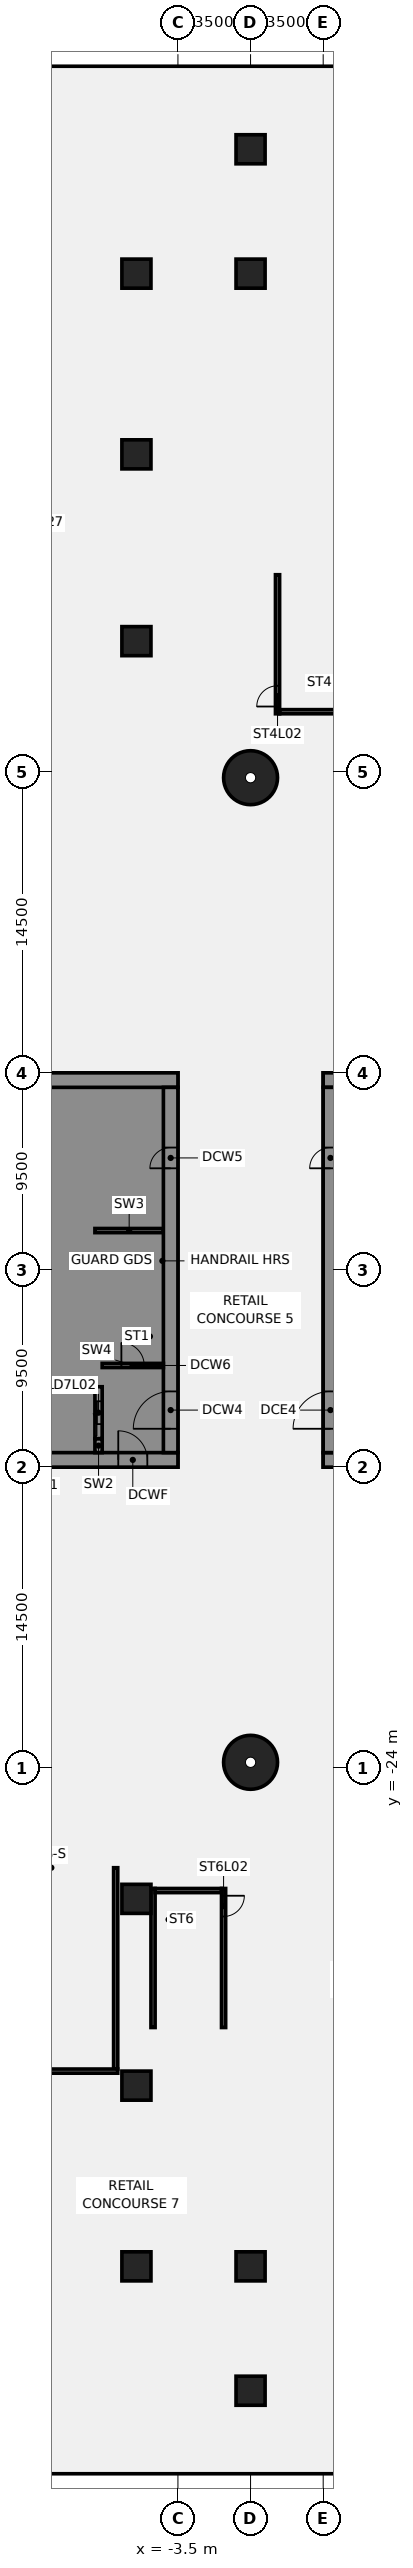
"""IFC4 building model, lengths in metres.
Left out: names, types, materials, properties, quantities, classifications, styles, units other than length and angle.
Written with IfcOpenShell. Run it as: python <this file> out.ifc"""

import sys

from ifc_helpers import new_model, si_unit, direction, frame, frame_2d, origin, origin_2d, place, context, subcontext, project, spatial, polyline, rectangle, circle, outline, extrude, element, fill, save


model = new_model("IFC4")
c1 = context("Model", 3, precision=1e-05, world=origin(), true_north=direction((0.0, 1.0)))
c2 = subcontext(c1, "Body", "Model", "MODEL_VIEW")
j1 = project(units=[si_unit("LENGTHUNIT", "METRE"), si_unit("PLANEANGLEUNIT", "RADIAN")], contexts=[c1])
p1 = place(None, origin())
s1 = spatial("IfcSite", under=j1, at=p1, CompositionType="ELEMENT")
p2 = place(p1, origin())
s2 = spatial("IfcBuilding", under=s1, at=p2, CompositionType="ELEMENT")
p3 = place(p2, frame((0.0, 0.0, 15.0)))
s3 = spatial("IfcBuildingStorey", under=s2, at=p3, CompositionType="ELEMENT", Elevation=15.0)
for number, where, z_axis, x_axis in (
    (1, (0.0, 23.721, -0.5), (0.0, 0.0, 1.0), (1.0, 0.0, 0.0)),
    (2, (0.0, -23.721, -0.5), (0.0, 0.0, 1.0), (1.0, 0.0, 0.0)),
):
    element("IfcColumn", number, at=place(p3, frame(where, z_axis=z_axis, x_axis=x_axis)), inside=s3, PredefinedType="COLUMN", context=c2, shape_type="SweptSolid", body=[
        extrude(circle(Radius=1.3, at=origin_2d()), origin(), (0.0, 0.0, 1.0), 5.0),
    ])
for number, where, z_axis, x_axis in (
    (3, (-5.5, 39.3, -0.5), (0.0, 0.0, 1.0), (1.0, 0.0, 0.0)),
    (4, (-5.5, 30.3, -0.5), (0.0, 0.0, 1.0), (1.0, 0.0, 0.0)),
    (5, (0.0, 48.008, -0.5), (0.0, 0.0, 1.0), (1.0, 0.0, 0.0)),
    (6, (-5.5, 48.008, -0.5), (0.0, 0.0, 1.0), (1.0, 0.0, 0.0)),
    (7, (-5.5, -39.3, -0.5), (0.0, 0.0, 1.0), (1.0, 0.0, 0.0)),
    (8, (-5.5, -30.3, -0.5), (0.0, 0.0, 1.0), (1.0, 0.0, 0.0)),
    (9, (-5.5, -48.008, -0.5), (0.0, 0.0, 1.0), (1.0, 0.0, 0.0)),
    (10, (0.0, -48.008, -0.5), (0.0, 0.0, 1.0), (1.0, 0.0, 0.0)),
    (11, (0.0, -54.0, -0.5), (0.0, 0.0, 1.0), (1.0, 0.0, 0.0)),
    (12, (0.0, 54.0, -0.5), (0.0, 0.0, 1.0), (1.0, 0.0, 0.0)),
):
    element("IfcColumn", number, at=place(p3, frame(where, z_axis=z_axis, x_axis=x_axis)), inside=s3, PredefinedType="COLUMN", context=c2, shape_type="SweptSolid", body=[
        extrude(rectangle(XDim=1.4, YDim=1.4, at=origin_2d()), origin(), (0.0, 0.0, 1.0), 5.0),
    ])
p4 = place(p3, frame((-6.5, -28.8, 0.0), z_axis=(0.0, 0.0, 1.0), x_axis=(0.0, -1.0, 0.0)))
e13 = element("IfcWall", 13, at=p4, inside=s3, PredefinedType="SOLIDWALL", context=c2, shape_type="SweptSolid", body=[
    extrude(rectangle(XDim=9.7, YDim=0.2, at=frame_2d((4.85, 0.0))), origin(), (0.0, 0.0, 1.0), 4.5),
])
p5 = place(p3, frame((-10.7, -38.6, 0.0), z_axis=(0.0, 0.0, 1.0), x_axis=(1.0, 0.0, 0.0)))
e14 = element("IfcWall", 14, at=p5, inside=s3, PredefinedType="SOLIDWALL", context=c2, shape_type="SweptSolid", body=[
    extrude(rectangle(XDim=4.3, YDim=0.2, at=frame_2d((2.15, 0.0))), origin(), (0.0, 0.0, 1.0), 4.5),
])
p6 = place(p3, frame((-16.5, -9.15, 0.0), z_axis=(0.0, 0.0, 1.0), x_axis=(1.0, 0.0, 0.0)))
e15 = element("IfcWall", 15, at=p6, inside=s3, PredefinedType="SHEAR", context=c2, shape_type="SweptSolid", body=[
    extrude(rectangle(XDim=13.0, YDim=0.7, at=frame_2d((6.5, 0.0))), origin(), (0.0, 0.0, 1.0), 4.5),
])
p7 = place(p6, frame((4.15, 0.0, 0.0)))
e16 = element("IfcOpeningElement", 16, at=p7, cuts=e15, PredefinedType="OPENING", context=c2, shape_type="SweptSolid", body=[
    extrude(rectangle(XDim=1.4, YDim=2.1, at=frame_2d((0.7, 1.05))), frame((0.0, 0.36, 0.0), z_axis=(0.0, -1.0, 0.0), x_axis=(1.0, 0.0, 0.0)), (0.0, 0.0, 1.0), 0.72),
])
p8 = place(p6, frame((10.125, 0.0, 0.0)))
e17 = element("IfcOpeningElement", 17, at=p8, cuts=e15, PredefinedType="OPENING", context=c2, shape_type="SweptSolid", body=[
    extrude(rectangle(XDim=1.4, YDim=2.1, at=frame_2d((0.7, 1.05))), frame((0.0, 0.36, 0.0), z_axis=(0.0, -1.0, 0.0), x_axis=(1.0, 0.0, 0.0)), (0.0, 0.0, 1.0), 0.72),
])
p9 = place(p3, frame((-16.5, 9.15, 0.0), z_axis=(0.0, 0.0, 1.0), x_axis=(1.0, 0.0, 0.0)))
e18 = element("IfcWall", 18, at=p9, inside=s3, PredefinedType="SHEAR", context=c2, shape_type="SweptSolid", body=[
    extrude(rectangle(XDim=13.0, YDim=0.7, at=frame_2d((6.5, 0.0))), origin(), (0.0, 0.0, 1.0), 4.5),
])
p10 = place(p3, origin())
e19 = element("IfcWall", 19, at=p10, inside=s3, PredefinedType="SHEAR", context=c2, shape_type="SweptSolid", body=[
    extrude(outline(polyline([(-9.8, -5.375), (-9.8, -5.625), (-7.5, -5.625), (-7.15, -5.625), (-7.15, 8.8), (-7.5, 8.8), (-9.8, 8.8), (-9.8, 8.125), (-7.5, 8.125), (-7.5, 5.625), (-9.8, 5.625), (-9.8, 5.375), (-7.5, 5.375), (-7.5, 2.875), (-9.8, 2.875), (-9.8, 2.625), (-7.5, 2.625), (-7.5, 0.125), (-9.8, 0.125), (-9.8, -0.125), (-7.5, -0.125), (-7.5, -2.625), (-9.8, -2.625), (-9.8, -2.875), (-7.5, -2.875), (-7.5, -5.375), (-9.8, -5.375)])), origin(), (0.0, 0.0, 1.0), 4.5),
])
p11 = place(p3, origin())
e20 = element("IfcWall", 20, at=p11, inside=s3, PredefinedType="SHEAR", context=c2, shape_type="SweptSolid", body=[
    extrude(outline(polyline([(-7.5, -8.125), (-9.55, -8.125), (-9.55, -5.625), (-9.8, -5.625), (-9.8, -8.125), (-9.8, -8.8), (-7.5, -8.8), (-7.5, -8.125)])), origin(), (0.0, 0.0, 1.0), 4.5),
])
p12 = place(p3, frame((-7.325, -8.8, 0.0), z_axis=(0.0, 0.0, 1.0), x_axis=(0.0, 1.0, 0.0)))
e21 = element("IfcWall", 21, at=p12, inside=s3, PredefinedType="SHEAR", context=c2, shape_type="SweptSolid", body=[
    extrude(rectangle(XDim=0.675, YDim=0.35, at=frame_2d((0.337, 0.0))), origin(), (0.0, 0.0, 1.0), 4.5),
])
p13 = place(p3, frame((-7.5, 1.9, 0.0), z_axis=(0.0, 0.0, 1.0), x_axis=(1.0, 0.0, 0.0)))
e22 = element("IfcWall", 22, at=p13, inside=s3, PredefinedType="SHEAR", context=c2, shape_type="SweptSolid", body=[
    extrude(rectangle(XDim=3.3, YDim=0.2, at=frame_2d((1.65, 0.0))), origin(), (0.0, 0.0, 1.0), 4.5),
])
p14 = place(p3, frame((-7.325, -8.125, 0.0), z_axis=(0.0, 0.0, 1.0), x_axis=(0.0, 1.0, 0.0)))
e23 = element("IfcWall", 23, at=p14, inside=s3, PredefinedType="SHEAR", context=c2, shape_type="SweptSolid", body=[
    extrude(rectangle(XDim=2.5, YDim=0.35, at=frame_2d((1.25, 0.0))), origin(), (0.0, 0.0, 1.0), 4.5),
])
p15 = place(p14, frame((0.7, 0.0, 0.0)))
e24 = element("IfcOpeningElement", 24, at=p15, cuts=e23, PredefinedType="OPENING", context=c2, shape_type="SweptSolid", body=[
    extrude(rectangle(XDim=1.1, YDim=2.1, at=frame_2d((0.55, 1.05))), frame((0.0, 0.185, 0.0), z_axis=(0.0, -1.0, 0.0), x_axis=(1.0, 0.0, 0.0)), (0.0, 0.0, 1.0), 0.37),
])
p16 = place(p3, frame((-3.85, -8.8, 0.0), z_axis=(0.0, 0.0, 1.0), x_axis=(0.0, 1.0, 0.0)))
e25 = element("IfcWall", 25, at=p16, inside=s3, PredefinedType="SHEAR", context=c2, shape_type="SweptSolid", body=[
    extrude(rectangle(XDim=17.6, YDim=0.7, at=frame_2d((8.8, 0.0))), origin(), (0.0, 0.0, 1.0), 4.5),
])
p17 = place(p16, frame((1.15, 0.0, 0.0)))
e26 = element("IfcOpeningElement", 26, at=p17, cuts=e25, PredefinedType="OPENING", context=c2, shape_type="SweptSolid", body=[
    extrude(rectangle(XDim=1.8, YDim=2.1, at=frame_2d((0.9, 1.05))), frame((0.0, 0.36, 0.0), z_axis=(0.0, -1.0, 0.0), x_axis=(1.0, 0.0, 0.0)), (0.0, 0.0, 1.0), 0.72),
])
p18 = place(p16, frame((13.7, 0.0, 0.0)))
e27 = element("IfcOpeningElement", 27, at=p18, cuts=e25, PredefinedType="OPENING", context=c2, shape_type="SweptSolid", body=[
    extrude(rectangle(XDim=1.0, YDim=2.1, at=frame_2d((0.5, 1.05))), frame((0.0, 0.36, 0.0), z_axis=(0.0, -1.0, 0.0), x_axis=(1.0, 0.0, 0.0)), (0.0, 0.0, 1.0), 0.72),
])
p19 = place(p3, frame((-7.15, -4.6, 0.0), z_axis=(0.0, 0.0, 1.0), x_axis=(1.0, 0.0, 0.0)))
e28 = element("IfcWall", 28, at=p19, inside=s3, PredefinedType="SHEAR", context=c2, shape_type="SweptSolid", body=[
    extrude(rectangle(XDim=2.95, YDim=0.2, at=frame_2d((1.475, 0.0))), origin(), (0.0, 0.0, 1.0), 4.5),
])
p20 = place(p19, frame((0.925, 0.0, 0.0)))
e29 = element("IfcOpeningElement", 29, at=p20, cuts=e28, PredefinedType="OPENING", context=c2, shape_type="SweptSolid", body=[
    extrude(rectangle(XDim=1.1, YDim=2.1, at=frame_2d((0.55, 1.05))), frame((0.0, 0.11, 0.0), z_axis=(0.0, -1.0, 0.0), x_axis=(1.0, 0.0, 0.0)), (0.0, 0.0, 1.0), 0.22),
])
p21 = place(p3, frame((16.5, -9.15, 0.0), z_axis=(0.0, 0.0, 1.0), x_axis=(-1.0, 0.0, 0.0)))
e30 = element("IfcWall", 30, at=p21, inside=s3, PredefinedType="SHEAR", context=c2, shape_type="SweptSolid", body=[
    extrude(rectangle(XDim=13.0, YDim=0.7, at=frame_2d((6.5, 0.0))), origin(), (0.0, 0.0, 1.0), 4.5),
])
p22 = place(p21, frame((4.15, 0.0, 0.0)))
e31 = element("IfcOpeningElement", 31, at=p22, cuts=e30, PredefinedType="OPENING", context=c2, shape_type="SweptSolid", body=[
    extrude(rectangle(XDim=1.4, YDim=2.1, at=frame_2d((0.7, 1.05))), frame((0.0, 0.36, 0.0), z_axis=(0.0, -1.0, 0.0), x_axis=(1.0, 0.0, 0.0)), (0.0, 0.0, 1.0), 0.72),
])
p23 = place(p21, frame((10.125, 0.0, 0.0)))
e32 = element("IfcOpeningElement", 32, at=p23, cuts=e30, PredefinedType="OPENING", context=c2, shape_type="SweptSolid", body=[
    extrude(rectangle(XDim=1.4, YDim=2.1, at=frame_2d((0.7, 1.05))), frame((0.0, 0.36, 0.0), z_axis=(0.0, -1.0, 0.0), x_axis=(1.0, 0.0, 0.0)), (0.0, 0.0, 1.0), 0.72),
])
p24 = place(p3, frame((16.5, 9.15, 0.0), z_axis=(0.0, 0.0, 1.0), x_axis=(-1.0, 0.0, 0.0)))
e33 = element("IfcWall", 33, at=p24, inside=s3, PredefinedType="SHEAR", context=c2, shape_type="SweptSolid", body=[
    extrude(rectangle(XDim=13.0, YDim=0.7, at=frame_2d((6.5, 0.0))), origin(), (0.0, 0.0, 1.0), 4.5),
])
p25 = place(p3, frame((3.85, -8.8, 0.0), z_axis=(0.0, 0.0, 1.0), x_axis=(0.0, 1.0, 0.0)))
e34 = element("IfcWall", 34, at=p25, inside=s3, PredefinedType="SHEAR", context=c2, shape_type="SweptSolid", body=[
    extrude(rectangle(XDim=17.6, YDim=0.7, at=frame_2d((8.8, 0.0))), origin(), (0.0, 0.0, 1.0), 4.5),
])
p26 = place(p25, frame((1.15, 0.0, 0.0)))
e35 = element("IfcOpeningElement", 35, at=p26, cuts=e34, PredefinedType="OPENING", context=c2, shape_type="SweptSolid", body=[
    extrude(rectangle(XDim=1.8, YDim=2.1, at=frame_2d((0.9, 1.05))), frame((0.0, 0.36, 0.0), z_axis=(0.0, -1.0, 0.0), x_axis=(1.0, 0.0, 0.0)), (0.0, 0.0, 1.0), 0.72),
])
p27 = place(p25, frame((13.7, 0.0, 0.0)))
e36 = element("IfcOpeningElement", 36, at=p27, cuts=e34, PredefinedType="OPENING", context=c2, shape_type="SweptSolid", body=[
    extrude(rectangle(XDim=1.0, YDim=2.1, at=frame_2d((0.5, 1.05))), frame((0.0, 0.36, 0.0), z_axis=(0.0, -1.0, 0.0), x_axis=(1.0, 0.0, 0.0)), (0.0, 0.0, 1.0), 0.72),
])
p28 = place(p3, frame((1.3, 26.8, 0.0), z_axis=(0.0, 0.0, 1.0), x_axis=(0.0, 1.0, 0.0)))
e37 = element("IfcWall", 37, at=p28, inside=s3, PredefinedType="SHEAR", context=c2, shape_type="SweptSolid", body=[
    extrude(rectangle(XDim=6.7, YDim=0.2, at=frame_2d((3.35, 0.0))), origin(), (0.0, 0.0, 1.0), 4.5),
])
p29 = place(p28, frame((0.35, 0.0, 0.0)))
e38 = element("IfcOpeningElement", 38, at=p29, cuts=e37, PredefinedType="OPENING", context=c2, shape_type="SweptSolid", body=[
    extrude(rectangle(XDim=1.0, YDim=2.1, at=frame_2d((0.5, 1.05))), frame((0.0, 0.11, 0.0), z_axis=(0.0, -1.0, 0.0), x_axis=(1.0, 0.0, 0.0)), (0.0, 0.0, 1.0), 0.22),
])
p30 = place(p3, frame((4.6, 26.9, 0.0), z_axis=(0.0, 0.0, 1.0), x_axis=(-1.0, 0.0, 0.0)))
e39 = element("IfcWall", 39, at=p30, inside=s3, PredefinedType="SHEAR", context=c2, shape_type="SweptSolid", body=[
    extrude(rectangle(XDim=3.2, YDim=0.2, at=frame_2d((1.6, 0.0))), origin(), (0.0, 0.0, 1.0), 4.5),
])
p31 = place(p3, origin())
e40 = element("IfcWall", 40, at=p31, inside=s3, PredefinedType="SHEAR", context=c2, shape_type="SweptSolid", body=[
    extrude(outline(polyline([(4.6, 33.3), (4.6, 33.5), (1.4, 33.5), (1.4, 33.3), (4.6, 33.3)])), origin(), (0.0, 0.0, 1.0), 4.5),
])
p32 = place(p3, frame((-1.3, -29.8, 0.0), z_axis=(0.0, 0.0, 1.0), x_axis=(0.0, -1.0, 0.0)))
e41 = element("IfcWall", 41, at=p32, inside=s3, PredefinedType="SHEAR", context=c2, shape_type="SweptSolid", body=[
    extrude(rectangle(XDim=6.7, YDim=0.2, at=frame_2d((3.35, 0.0))), origin(), (0.0, 0.0, 1.0), 4.5),
])
p33 = place(p32, frame((0.35, 0.0, 0.0)))
e42 = element("IfcOpeningElement", 42, at=p33, cuts=e41, PredefinedType="OPENING", context=c2, shape_type="SweptSolid", body=[
    extrude(rectangle(XDim=1.0, YDim=2.1, at=frame_2d((0.5, 1.05))), frame((0.0, 0.11, 0.0), z_axis=(0.0, -1.0, 0.0), x_axis=(1.0, 0.0, 0.0)), (0.0, 0.0, 1.0), 0.22),
])
p34 = place(p3, frame((-4.7, -29.8, 0.0), z_axis=(0.0, 0.0, 1.0), x_axis=(0.0, -1.0, 0.0)))
e43 = element("IfcWall", 43, at=p34, inside=s3, PredefinedType="SHEAR", context=c2, shape_type="SweptSolid", body=[
    extrude(rectangle(XDim=6.7, YDim=0.2, at=frame_2d((3.35, 0.0))), origin(), (0.0, 0.0, 1.0), 4.5),
])
p35 = place(p3, frame((-4.6, -29.9, 0.0), z_axis=(0.0, 0.0, 1.0), x_axis=(1.0, 0.0, 0.0)))
e44 = element("IfcWall", 44, at=p35, inside=s3, PredefinedType="SHEAR", context=c2, shape_type="SweptSolid", body=[
    extrude(rectangle(XDim=3.2, YDim=0.2, at=frame_2d((1.6, 0.0))), origin(), (0.0, 0.0, 1.0), 4.5),
])
p36 = place(p3, origin())
e45 = element("IfcWall", 45, at=p36, inside=s3, PredefinedType="SHEAR", context=c2, shape_type="SweptSolid", body=[
    extrude(outline(polyline([(-4.6, -36.3), (-4.6, -36.5), (-1.4, -36.5), (-1.4, -36.3), (-4.6, -36.3)])), origin(), (0.0, 0.0, 1.0), 4.5),
])
p37 = place(p8, origin())
e46 = element("IfcDoor", 46, at=p37, inside=s3, OperationType="SINGLE_SWING_LEFT", PredefinedType="DOOR", context=c2, shape_type="SweptSolid", body=[
    extrude(rectangle(XDim=1.4, YDim=2.1, at=frame_2d((0.7, 1.05))), frame((0.0, 0.025, 0.0), z_axis=(0.0, -1.0, 0.0), x_axis=(1.0, 0.0, 0.0)), (0.0, 0.0, 1.0), 0.05),
])
fill(e17, e46)
p38 = place(p17, origin())
e47 = element("IfcDoor", 47, at=p38, inside=s3, OperationType="SINGLE_SWING_LEFT", PredefinedType="DOOR", context=c2, shape_type="SweptSolid", body=[
    extrude(rectangle(XDim=1.8, YDim=2.1, at=frame_2d((0.9, 1.05))), frame((0.0, 0.025, 0.0), z_axis=(0.0, -1.0, 0.0), x_axis=(1.0, 0.0, 0.0)), (0.0, 0.0, 1.0), 0.05),
])
fill(e26, e47)
p39 = place(p18, origin())
e48 = element("IfcDoor", 48, at=p39, inside=s3, OperationType="SINGLE_SWING_LEFT", PredefinedType="DOOR", context=c2, shape_type="SweptSolid", body=[
    extrude(rectangle(XDim=1.0, YDim=2.1, at=frame_2d((0.5, 1.05))), frame((0.0, 0.025, 0.0), z_axis=(0.0, -1.0, 0.0), x_axis=(1.0, 0.0, 0.0)), (0.0, 0.0, 1.0), 0.05),
])
fill(e27, e48)
p40 = place(p20, origin())
e49 = element("IfcDoor", 49, at=p40, inside=s3, OperationType="SINGLE_SWING_LEFT", PredefinedType="DOOR", context=c2, shape_type="SweptSolid", body=[
    extrude(rectangle(XDim=1.1, YDim=2.1, at=frame_2d((0.55, 1.05))), frame((0.0, 0.025, 0.0), z_axis=(0.0, -1.0, 0.0), x_axis=(1.0, 0.0, 0.0)), (0.0, 0.0, 1.0), 0.05),
])
fill(e29, e49)
p41 = place(p15, origin())
e50 = element("IfcDoor", 50, at=p41, inside=s3, OperationType="SLIDING_TO_LEFT", PredefinedType="DOOR", context=c2, shape_type="SweptSolid", body=[
    extrude(rectangle(XDim=1.1, YDim=2.1, at=frame_2d((0.55, 1.05))), frame((0.0, 0.025, 0.0), z_axis=(0.0, -1.0, 0.0), x_axis=(1.0, 0.0, 0.0)), (0.0, 0.0, 1.0), 0.05),
])
fill(e24, e50)
p42 = place(p26, origin())
e51 = element("IfcDoor", 51, at=p42, inside=s3, OperationType="SINGLE_SWING_LEFT", PredefinedType="DOOR", context=c2, shape_type="SweptSolid", body=[
    extrude(rectangle(XDim=1.8, YDim=2.1, at=frame_2d((0.9, 1.05))), frame((0.0, 0.025, 0.0), z_axis=(0.0, -1.0, 0.0), x_axis=(1.0, 0.0, 0.0)), (0.0, 0.0, 1.0), 0.05),
])
fill(e35, e51)
p43 = place(p27, origin())
e52 = element("IfcDoor", 52, at=p43, inside=s3, OperationType="SINGLE_SWING_LEFT", PredefinedType="DOOR", context=c2, shape_type="SweptSolid", body=[
    extrude(rectangle(XDim=1.0, YDim=2.1, at=frame_2d((0.5, 1.05))), frame((0.0, 0.025, 0.0), z_axis=(0.0, -1.0, 0.0), x_axis=(1.0, 0.0, 0.0)), (0.0, 0.0, 1.0), 0.05),
])
fill(e36, e52)
p44 = place(p29, origin())
e53 = element("IfcDoor", 53, at=p44, inside=s3, OperationType="SINGLE_SWING_LEFT", PredefinedType="DOOR", context=c2, shape_type="SweptSolid", body=[
    extrude(rectangle(XDim=1.0, YDim=2.1, at=frame_2d((0.5, 1.05))), frame((0.0, 0.025, 0.0), z_axis=(0.0, -1.0, 0.0), x_axis=(1.0, 0.0, 0.0)), (0.0, 0.0, 1.0), 0.05),
])
fill(e38, e53)
p45 = place(p33, origin())
e54 = element("IfcDoor", 54, at=p45, inside=s3, OperationType="SINGLE_SWING_LEFT", PredefinedType="DOOR", context=c2, shape_type="SweptSolid", body=[
    extrude(rectangle(XDim=1.0, YDim=2.1, at=frame_2d((0.5, 1.05))), frame((0.0, 0.025, 0.0), z_axis=(0.0, -1.0, 0.0), x_axis=(1.0, 0.0, 0.0)), (0.0, 0.0, 1.0), 0.05),
])
fill(e42, e54)
save(model, sys.argv[1])
